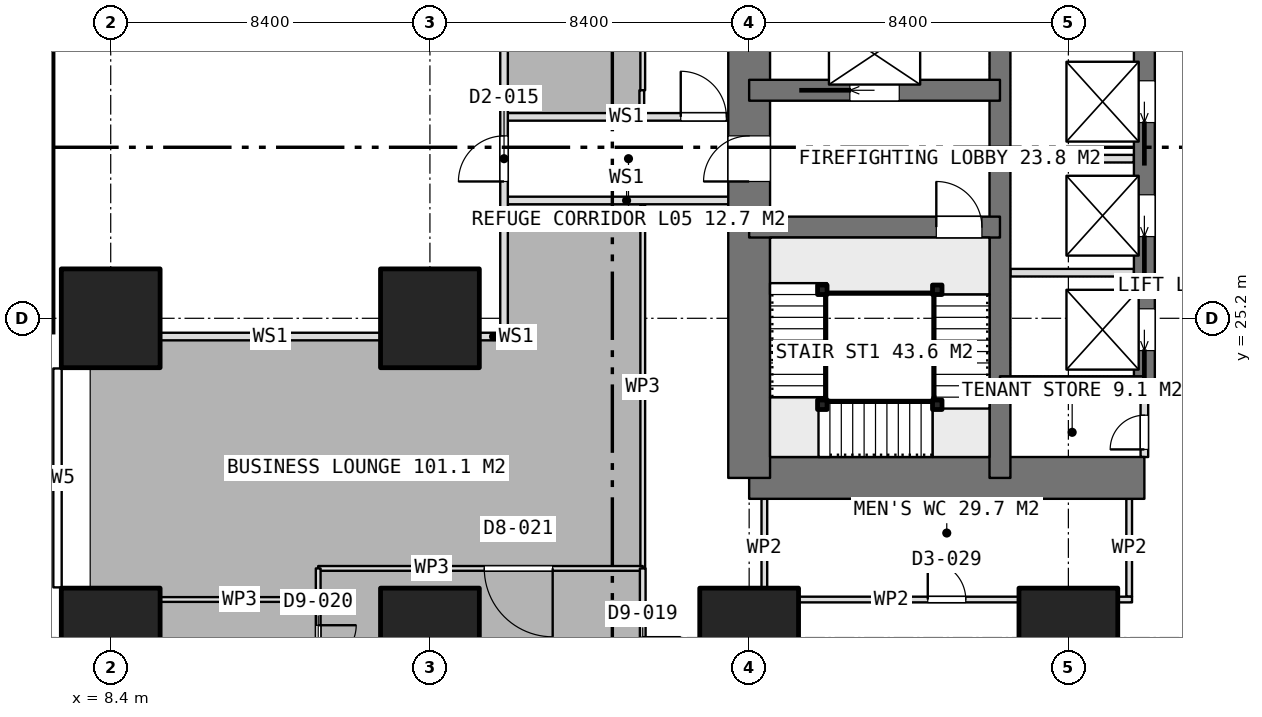
"""IFC4 building model, lengths in metres.
Left out: names, types, materials, properties, quantities, classifications, styles, units other than length and angle.
Written with IfcOpenShell. Run it as: python <this file> out.ifc"""

import sys

from ifc_helpers import new_model, si_unit, direction, frame, frame_2d, origin, origin_2d, place, context, subcontext, project, spatial, rectangle, extrude, element, fill, save


model = new_model("IFC4")
c1 = context("Model", 3, precision=1e-05, world=origin(), true_north=direction((0.0, 1.0)))
c2 = subcontext(c1, "Body", "Model", "MODEL_VIEW")
j1 = project(units=[si_unit("LENGTHUNIT", "METRE"), si_unit("PLANEANGLEUNIT", "RADIAN")], contexts=[c1])
p1 = place(None, origin())
s1 = spatial("IfcSite", under=j1, at=p1, CompositionType="ELEMENT")
p2 = place(p1, origin())
s2 = spatial("IfcBuilding", under=s1, at=p2, CompositionType="ELEMENT")
p3 = place(p2, frame((0.0, 0.0, 25.4)))
s3 = spatial("IfcBuildingStorey", under=s2, at=p3, CompositionType="ELEMENT", Elevation=25.4)
p4 = place(p3, frame((25.2, 21.0, 0.0), z_axis=(0.0, 0.0, 1.0), x_axis=(1.0, 0.0, 0.0)))
e1 = element("IfcWall", 1, at=p4, inside=s3, PredefinedType="SHEAR", context=c2, shape_type="SweptSolid", body=[
    extrude(rectangle(XDim=10.4, YDim=1.1, at=frame_2d((5.2, 0.0))), origin(), (0.0, 0.0, 1.0), 3.75),
])
p5 = place(p3, frame((25.2, 21.0, 0.0), z_axis=(0.0, 0.0, 1.0), x_axis=(0.0, 1.0, 0.0)))
e2 = element("IfcWall", 2, at=p5, inside=s3, PredefinedType="SHEAR", context=c2, shape_type="SweptSolid", body=[
    extrude(rectangle(XDim=25.2, YDim=1.1, at=frame_2d((12.6, 0.0))), origin(), (0.0, 0.0, 1.0), 3.75),
])
p6 = place(p5, frame((7.8, 0.0, 0.0)))
e3 = element("IfcOpeningElement", 3, at=p6, cuts=e2, PredefinedType="OPENING", context=c2, shape_type="SweptSolid", body=[
    extrude(rectangle(XDim=1.2, YDim=2.1, at=frame_2d((0.6, 1.05))), frame((0.0, 0.56, 0.0), z_axis=(0.0, -1.0, 0.0), x_axis=(1.0, 0.0, 0.0)), (0.0, 0.0, 1.0), 1.12),
])
p7 = place(p5, frame((14.25, 0.0, 0.0)))
e4 = element("IfcOpeningElement", 4, at=p7, cuts=e2, PredefinedType="OPENING", context=c2, shape_type="SweptSolid", body=[
    extrude(rectangle(XDim=0.9, YDim=2.1, at=frame_2d((0.45, 1.05))), frame((0.0, 0.56, 0.0), z_axis=(0.0, -1.0, 0.0), x_axis=(1.0, 0.0, 0.0)), (0.0, 0.0, 1.0), 1.12),
])
p8 = place(p5, frame((16.85, 0.0, 0.0)))
e5 = element("IfcOpeningElement", 5, at=p8, cuts=e2, PredefinedType="OPENING", context=c2, shape_type="SweptSolid", body=[
    extrude(rectangle(XDim=0.9, YDim=2.1, at=frame_2d((0.45, 1.05))), frame((0.0, 0.56, 0.0), z_axis=(0.0, -1.0, 0.0), x_axis=(1.0, 0.0, 0.0)), (0.0, 0.0, 1.0), 1.12),
])
p9 = place(p5, frame((19.075, 0.0, 0.0)))
e6 = element("IfcOpeningElement", 6, at=p9, cuts=e2, PredefinedType="OPENING", context=c2, shape_type="SweptSolid", body=[
    extrude(rectangle(XDim=1.2, YDim=2.1, at=frame_2d((0.6, 1.05))), frame((0.0, 0.56, 0.0), z_axis=(0.0, -1.0, 0.0), x_axis=(1.0, 0.0, 0.0)), (0.0, 0.0, 1.0), 1.12),
])
p10 = place(p3, frame((31.8, 21.0, 0.0), z_axis=(0.0, 0.0, 1.0), x_axis=(0.0, 1.0, 0.0)))
e7 = element("IfcWall", 7, at=p10, inside=s3, PredefinedType="SHEAR", context=c2, shape_type="SweptSolid", body=[
    extrude(rectangle(XDim=25.2, YDim=0.55, at=frame_2d((12.6, 0.0))), origin(), (0.0, 0.0, 1.0), 3.75),
])
p11 = place(p3, frame((35.6, 23.4, 0.0), z_axis=(0.0, 0.0, 1.0), x_axis=(0.0, 1.0, 0.0)))
e8 = element("IfcWall", 8, at=p11, inside=s3, PredefinedType="SHEAR", context=c2, shape_type="SweptSolid", body=[
    extrude(rectangle(XDim=18.0, YDim=0.55, at=frame_2d((9.0, 0.0))), origin(), (0.0, 0.0, 1.0), 3.75),
])
p12 = place(p11, frame((0.95, 0.0, 0.0)))
e9 = element("IfcOpeningElement", 9, at=p12, cuts=e8, PredefinedType="OPENING", context=c2, shape_type="SweptSolid", body=[
    extrude(rectangle(XDim=1.1, YDim=2.1, at=frame_2d((0.55, 1.05))), frame((0.0, 0.285, 0.0), z_axis=(0.0, -1.0, 0.0), x_axis=(1.0, 0.0, 0.0)), (0.0, 0.0, 1.0), 0.57),
])
p13 = place(p11, frame((3.95, 0.0, 0.0)))
e10 = element("IfcOpeningElement", 10, at=p13, cuts=e8, PredefinedType="OPENING", context=c2, shape_type="SweptSolid", body=[
    extrude(rectangle(XDim=1.1, YDim=2.1, at=frame_2d((0.55, 1.05))), frame((0.0, 0.285, 0.0), z_axis=(0.0, -1.0, 0.0), x_axis=(1.0, 0.0, 0.0)), (0.0, 0.0, 1.0), 0.57),
])
p14 = place(p11, frame((6.95, 0.0, 0.0)))
e11 = element("IfcOpeningElement", 11, at=p14, cuts=e8, PredefinedType="OPENING", context=c2, shape_type="SweptSolid", body=[
    extrude(rectangle(XDim=1.1, YDim=2.1, at=frame_2d((0.55, 1.05))), frame((0.0, 0.285, 0.0), z_axis=(0.0, -1.0, 0.0), x_axis=(1.0, 0.0, 0.0)), (0.0, 0.0, 1.0), 0.57),
])
p15 = place(p11, frame((9.95, 0.0, 0.0)))
e12 = element("IfcOpeningElement", 12, at=p15, cuts=e8, PredefinedType="OPENING", context=c2, shape_type="SweptSolid", body=[
    extrude(rectangle(XDim=1.1, YDim=2.1, at=frame_2d((0.55, 1.05))), frame((0.0, 0.285, 0.0), z_axis=(0.0, -1.0, 0.0), x_axis=(1.0, 0.0, 0.0)), (0.0, 0.0, 1.0), 0.57),
])
p16 = place(p11, frame((12.95, 0.0, 0.0)))
e13 = element("IfcOpeningElement", 13, at=p16, cuts=e8, PredefinedType="OPENING", context=c2, shape_type="SweptSolid", body=[
    extrude(rectangle(XDim=1.1, YDim=2.1, at=frame_2d((0.55, 1.05))), frame((0.0, 0.285, 0.0), z_axis=(0.0, -1.0, 0.0), x_axis=(1.0, 0.0, 0.0)), (0.0, 0.0, 1.0), 0.57),
])
p17 = place(p11, frame((15.95, 0.0, 0.0)))
e14 = element("IfcOpeningElement", 14, at=p17, cuts=e8, PredefinedType="OPENING", context=c2, shape_type="SweptSolid", body=[
    extrude(rectangle(XDim=1.1, YDim=2.1, at=frame_2d((0.55, 1.05))), frame((0.0, 0.285, 0.0), z_axis=(0.0, -1.0, 0.0), x_axis=(1.0, 0.0, 0.0)), (0.0, 0.0, 1.0), 0.57),
])
p18 = place(p3, frame((31.8, 23.4, 0.0), z_axis=(0.0, 0.0, 1.0), x_axis=(1.0, 0.0, 0.0)))
e15 = element("IfcWall", 15, at=p18, inside=s3, PredefinedType="SHEAR", context=c2, shape_type="SweptSolid", body=[
    extrude(rectangle(XDim=3.8, YDim=0.55, at=frame_2d((1.9, 0.0))), origin(), (0.0, 0.0, 1.0), 3.75),
])
p19 = place(p3, frame((25.2, 27.6, 0.0), z_axis=(0.0, 0.0, 1.0), x_axis=(1.0, 0.0, 0.0)))
e16 = element("IfcWall", 16, at=p19, inside=s3, PredefinedType="SHEAR", context=c2, shape_type="SweptSolid", body=[
    extrude(rectangle(XDim=6.6, YDim=0.55, at=frame_2d((3.3, 0.0))), origin(), (0.0, 0.0, 1.0), 3.75),
])
p20 = place(p19, frame((4.925, 0.0, 0.0)))
e17 = element("IfcOpeningElement", 17, at=p20, cuts=e16, PredefinedType="OPENING", context=c2, shape_type="SweptSolid", body=[
    extrude(rectangle(XDim=1.2, YDim=2.1, at=frame_2d((0.6, 1.05))), frame((0.0, 0.285, 0.0), z_axis=(0.0, -1.0, 0.0), x_axis=(1.0, 0.0, 0.0)), (0.0, 0.0, 1.0), 0.57),
])
p21 = place(p3, frame((25.2, 31.2, 0.0), z_axis=(0.0, 0.0, 1.0), x_axis=(1.0, 0.0, 0.0)))
e18 = element("IfcWall", 18, at=p21, inside=s3, PredefinedType="SHEAR", context=c2, shape_type="SweptSolid", body=[
    extrude(rectangle(XDim=6.6, YDim=0.55, at=frame_2d((3.3, 0.0))), origin(), (0.0, 0.0, 1.0), 3.75),
])
p22 = place(p21, frame((2.65, 0.0, 0.0)))
e19 = element("IfcOpeningElement", 19, at=p22, cuts=e18, PredefinedType="OPENING", context=c2, shape_type="SweptSolid", body=[
    extrude(rectangle(XDim=1.3, YDim=2.1, at=frame_2d((0.65, 1.05))), frame((0.0, 0.285, 0.0), z_axis=(0.0, -1.0, 0.0), x_axis=(1.0, 0.0, 0.0)), (0.0, 0.0, 1.0), 0.57),
])
for number, where, z_axis, x_axis in (
    (20, (8.4, 16.8, 0.0), (0.0, 0.0, 1.0), (1.0, 0.0, 0.0)),
    (21, (8.4, 25.2, 0.0), (0.0, 0.0, 1.0), (1.0, 0.0, 0.0)),
    (22, (16.8, 16.8, 0.0), (0.0, 0.0, 1.0), (1.0, 0.0, 0.0)),
    (23, (16.8, 25.2, 0.0), (0.0, 0.0, 1.0), (1.0, 0.0, 0.0)),
    (24, (25.2, 16.8, 0.0), (0.0, 0.0, 1.0), (1.0, 0.0, 0.0)),
    (25, (33.6, 16.8, 0.0), (0.0, 0.0, 1.0), (1.0, 0.0, 0.0)),
):
    element("IfcColumn", number, at=place(p3, frame(where, z_axis=z_axis, x_axis=x_axis)), inside=s3, PredefinedType="COLUMN", context=c2, shape_type="SweptSolid", body=[
        extrude(rectangle(XDim=2.6, YDim=2.6, at=origin_2d()), origin(), (0.0, 0.0, 1.0), 3.75),
    ])
for number, where, z_axis, x_axis in (
    (26, (32.075, 26.4, 0.0), (0.0, 0.0, 1.0), (1.0, 0.0, 0.0)),
    (27, (32.075, 29.4, 0.0), (0.0, 0.0, 1.0), (1.0, 0.0, 0.0)),
):
    element("IfcWall", number, at=place(p3, frame(where, z_axis=z_axis, x_axis=x_axis)), inside=s3, PredefinedType="PARTITIONING", context=c2, shape_type="SweptSolid", body=[
        extrude(rectangle(XDim=3.25, YDim=0.2, at=frame_2d((1.625, 0.0))), origin(), (0.0, 0.0, 1.0), 3.5),
    ])
p23 = place(p3, frame((35.6, 21.55, 0.0), z_axis=(0.0, 0.0, 1.0), x_axis=(0.0, 1.0, 0.0)))
e28 = element("IfcWall", 28, at=p23, inside=s3, PredefinedType="PARTITIONING", context=c2, shape_type="SweptSolid", body=[
    extrude(rectangle(XDim=1.575, YDim=0.2, at=frame_2d((0.788, 0.0))), origin(), (0.0, 0.0, 1.0), 3.5),
])
p24 = place(p23, frame((0.2, 0.0, 0.0)))
e29 = element("IfcOpeningElement", 29, at=p24, cuts=e28, PredefinedType="OPENING", context=c2, shape_type="SweptSolid", body=[
    extrude(rectangle(XDim=0.9, YDim=2.1, at=frame_2d((0.45, 1.05))), frame((0.0, 0.11, 0.0), z_axis=(0.0, -1.0, 0.0), x_axis=(1.0, 0.0, 0.0)), (0.0, 0.0, 1.0), 0.22),
])
p25 = place(p3, frame((25.525, 17.8, 0.0), z_axis=(0.0, 0.0, 1.0), x_axis=(1.0, 0.0, 0.0)))
e30 = element("IfcWall", 30, at=p25, inside=s3, PredefinedType="PARTITIONING", context=c2, shape_type="SweptSolid", body=[
    extrude(rectangle(XDim=9.75, YDim=0.15, at=frame_2d((4.875, 0.0))), origin(), (0.0, 0.0, 1.0), 3.5),
])
p26 = place(p25, frame((4.375, 0.0, 0.0)))
e31 = element("IfcOpeningElement", 31, at=p26, cuts=e30, PredefinedType="OPENING", context=c2, shape_type="SweptSolid", body=[
    extrude(rectangle(XDim=1.0, YDim=2.1, at=frame_2d((0.5, 1.05))), frame((0.0, 0.085, 0.0), z_axis=(0.0, -1.0, 0.0), x_axis=(1.0, 0.0, 0.0)), (0.0, 0.0, 1.0), 0.17),
])
for number, where, z_axis, x_axis in (
    (32, (25.6, 17.875, 0.0), (0.0, 0.0, 1.0), (0.0, 1.0, 0.0)),
    (33, (35.2, 17.875, 0.0), (0.0, 0.0, 1.0), (0.0, 1.0, 0.0)),
):
    element("IfcWall", number, at=place(p3, frame(where, z_axis=z_axis, x_axis=x_axis)), inside=s3, PredefinedType="PARTITIONING", context=c2, shape_type="SweptSolid", body=[
        extrude(rectangle(XDim=2.575, YDim=0.15, at=frame_2d((1.288, 0.0))), origin(), (0.0, 0.0, 1.0), 3.5),
    ])
p27 = place(p3, frame((22.4, 53.2, 0.0), z_axis=(0.0, 0.0, 1.0), x_axis=(0.0, -1.0, 0.0)))
e34 = element("IfcWall", 34, at=p27, inside=s3, PredefinedType="PARTITIONING", context=c2, shape_type="SweptSolid", body=[
    extrude(rectangle(XDim=22.0, YDim=0.125, at=frame_2d((11.0, 0.0))), origin(), (0.0, 0.0, 1.0), 3.5),
])
p28 = place(p3, frame((22.375, 31.2, 0.0), z_axis=(0.0, 0.0, 1.0), x_axis=(0.0, -1.0, 0.0)))
e35 = element("IfcWall", 35, at=p28, inside=s3, PredefinedType="PARTITIONING", context=c2, shape_type="SweptSolid", body=[
    extrude(rectangle(XDim=0.589, YDim=0.125, at=frame_2d((0.294, 0.0))), origin(), (0.0, 0.0, 1.0), 3.5),
])
p29 = place(p3, frame((13.86, 17.801, 0.0), z_axis=(0.0, 0.0, 1.0), x_axis=(-1.0, 0.0, 0.0)))
e36 = element("IfcWall", 36, at=p29, inside=s3, PredefinedType="PARTITIONING", context=c2, shape_type="SweptSolid", body=[
    extrude(rectangle(XDim=4.14, YDim=0.125, at=frame_2d((2.07, 0.0))), origin(), (0.0, 0.0, 1.0), 3.5),
])
p30 = place(p3, frame((22.4, 28.189, 0.0), z_axis=(0.0, 0.0, 1.0), x_axis=(0.0, -1.0, 0.0)))
e37 = element("IfcWall", 37, at=p30, inside=s3, PredefinedType="PARTITIONING", context=c2, shape_type="SweptSolid", body=[
    extrude(rectangle(XDim=9.57, YDim=0.125, at=frame_2d((4.785, 0.0))), origin(), (0.0, 0.0, 1.0), 3.5),
])
p31 = place(p3, frame((22.4, 18.619, 0.0), z_axis=(0.0, 0.0, 1.0), x_axis=(-1.0, 0.0, 0.0)))
e38 = element("IfcWall", 38, at=p31, inside=s3, PredefinedType="PARTITIONING", context=c2, shape_type="SweptSolid", body=[
    extrude(rectangle(XDim=8.54, YDim=0.125, at=frame_2d((4.27, 0.0))), origin(), (0.0, 0.0, 1.0), 3.5),
])
p32 = place(p31, frame((2.37, 0.0, 0.0)))
e39 = element("IfcOpeningElement", 39, at=p32, cuts=e38, PredefinedType="OPENING", context=c2, shape_type="SweptSolid", body=[
    extrude(rectangle(XDim=1.8, YDim=2.1, at=frame_2d((0.9, 1.05))), frame((0.0, 0.073, 0.0), z_axis=(0.0, -1.0, 0.0), x_axis=(1.0, 0.0, 0.0)), (0.0, 0.0, 1.0), 0.145),
])
p33 = place(p3, frame((13.86, 18.619, 0.0), z_axis=(0.0, 0.0, 1.0), x_axis=(0.0, -1.0, 0.0)))
e40 = element("IfcWall", 40, at=p33, inside=s3, PredefinedType="PARTITIONING", context=c2, shape_type="SweptSolid", body=[
    extrude(rectangle(XDim=0.818, YDim=0.125, at=frame_2d((0.409, 0.0))), origin(), (0.0, 0.0, 1.0), 3.5),
])
p34 = place(p3, frame((13.86, 17.8, 0.0), z_axis=(0.0, 0.0, 1.0), x_axis=(0.0, -1.0, 0.0)))
e41 = element("IfcWall", 41, at=p34, inside=s3, PredefinedType="PARTITIONING", context=c2, shape_type="SweptSolid", body=[
    extrude(rectangle(XDim=2.352, YDim=0.125, at=frame_2d((1.176, 0.0))), origin(), (0.0, 0.0, 1.0), 3.5),
])
p35 = place(p34, frame((0.676, 0.0, 0.0)))
e42 = element("IfcOpeningElement", 42, at=p35, cuts=e41, PredefinedType="OPENING", context=c2, shape_type="SweptSolid", body=[
    extrude(rectangle(XDim=1.0, YDim=2.1, at=frame_2d((0.5, 1.05))), frame((0.0, 0.073, 0.0), z_axis=(0.0, -1.0, 0.0), x_axis=(1.0, 0.0, 0.0)), (0.0, 0.0, 1.0), 0.145),
])
p36 = place(p3, frame((22.4, 18.619, 0.0), z_axis=(0.0, 0.0, 1.0), x_axis=(0.0, -1.0, 0.0)))
e43 = element("IfcWall", 43, at=p36, inside=s3, PredefinedType="PARTITIONING", context=c2, shape_type="SweptSolid", body=[
    extrude(rectangle(XDim=4.619, YDim=0.15, at=frame_2d((2.31, 0.0))), origin(), (0.0, 0.0, 1.0), 3.5),
])
p37 = place(p36, frame((1.809, 0.0, 0.0)))
e44 = element("IfcOpeningElement", 44, at=p37, cuts=e43, PredefinedType="OPENING", context=c2, shape_type="SweptSolid", body=[
    extrude(rectangle(XDim=1.0, YDim=2.1, at=frame_2d((0.5, 1.05))), frame((0.0, 0.085, 0.0), z_axis=(0.0, -1.0, 0.0), x_axis=(1.0, 0.0, 0.0)), (0.0, 0.0, 1.0), 0.17),
])
for number, where, z_axis, x_axis in (
    (45, (30.15, 25.95, 0.0), (0.0, 0.0, 1.0), (1.0, 0.0, 0.0)),
    (46, (30.15, 22.925, 0.0), (0.0, 0.0, 1.0), (1.0, 0.0, 0.0)),
    (47, (27.125, 22.925, 0.0), (0.0, 0.0, 1.0), (1.0, 0.0, 0.0)),
    (48, (27.125, 25.95, 0.0), (0.0, 0.0, 1.0), (1.0, 0.0, 0.0)),
):
    element("IfcColumn", number, at=place(p3, frame(where, z_axis=z_axis, x_axis=x_axis)), inside=s3, PredefinedType="COLUMN", context=c2, shape_type="SweptSolid", body=[
        extrude(rectangle(XDim=0.25, YDim=0.25, at=origin_2d()), origin(), (0.0, 0.0, 1.0), 3.75),
    ])
p38 = place(p3, frame((18.75, 24.82, 0.0), z_axis=(0.0, 0.0, 1.0), x_axis=(0.0, 1.0, 0.0)))
e49 = element("IfcWall", 49, at=p38, inside=s3, PredefinedType="PARTITIONING", context=c2, shape_type="SweptSolid", body=[
    extrude(rectangle(XDim=26.44, YDim=0.2, at=frame_2d((13.22, 0.0))), origin(), (0.0, 0.0, 1.0), 3.5),
])
p39 = place(p38, frame((3.98, 0.0, 0.0)))
e50 = element("IfcOpeningElement", 50, at=p39, cuts=e49, PredefinedType="OPENING", context=c2, shape_type="SweptSolid", body=[
    extrude(rectangle(XDim=1.2, YDim=2.1, at=frame_2d((0.6, 1.05))), frame((0.0, 0.11, 0.0), z_axis=(0.0, -1.0, 0.0), x_axis=(1.0, 0.0, 0.0)), (0.0, 0.0, 1.0), 0.22),
])
p40 = place(p3, frame((9.7, 24.72, 0.0), z_axis=(0.0, 0.0, 1.0), x_axis=(1.0, 0.0, 0.0)))
e51 = element("IfcWall", 51, at=p40, inside=s3, PredefinedType="PARTITIONING", context=c2, shape_type="SweptSolid", body=[
    extrude(rectangle(XDim=5.8, YDim=0.2, at=frame_2d((2.9, 0.0))), origin(), (0.0, 0.0, 1.0), 3.5),
])
p41 = place(p3, frame((18.1, 24.72, 0.0), z_axis=(0.0, 0.0, 1.0), x_axis=(1.0, 0.0, 0.0)))
e52 = element("IfcWall", 52, at=p41, inside=s3, PredefinedType="PARTITIONING", context=c2, shape_type="SweptSolid", body=[
    extrude(rectangle(XDim=0.75, YDim=0.2, at=frame_2d((0.375, 0.0))), origin(), (0.0, 0.0, 1.0), 3.5),
])
p42 = place(p3, frame((18.75, 30.5, 0.0), z_axis=(0.0, 0.0, 1.0), x_axis=(1.0, 0.0, 0.0)))
e53 = element("IfcWall", 53, at=p42, inside=s3, PredefinedType="PARTITIONING", context=c2, shape_type="SweptSolid", body=[
    extrude(rectangle(XDim=6.45, YDim=0.2, at=frame_2d((3.225, 0.0))), origin(), (0.0, 0.0, 1.0), 3.5),
])
p43 = place(p42, frame((4.65, 0.0, 0.0)))
e54 = element("IfcOpeningElement", 54, at=p43, cuts=e53, PredefinedType="OPENING", context=c2, shape_type="SweptSolid", body=[
    extrude(rectangle(XDim=1.2, YDim=2.1, at=frame_2d((0.6, 1.05))), frame((0.0, 0.11, 0.0), z_axis=(0.0, -1.0, 0.0), x_axis=(1.0, 0.0, 0.0)), (0.0, 0.0, 1.0), 0.22),
])
p44 = place(p3, frame((18.75, 28.3, 0.0), z_axis=(0.0, 0.0, 1.0), x_axis=(1.0, 0.0, 0.0)))
e55 = element("IfcWall", 55, at=p44, inside=s3, PredefinedType="PARTITIONING", context=c2, shape_type="SweptSolid", body=[
    extrude(rectangle(XDim=6.45, YDim=0.2, at=frame_2d((3.225, 0.0))), origin(), (0.0, 0.0, 1.0), 3.5),
])
p45 = place(p6, origin())
e56 = element("IfcDoor", 56, at=p45, inside=s3, OperationType="SINGLE_SWING_LEFT", PredefinedType="DOOR", context=c2, shape_type="SweptSolid", body=[
    extrude(rectangle(XDim=1.2, YDim=2.1, at=frame_2d((0.6, 1.05))), frame((0.0, 0.025, 0.0), z_axis=(0.0, -1.0, 0.0), x_axis=(1.0, 0.0, 0.0)), (0.0, 0.0, 1.0), 0.05),
])
fill(e3, e56)
p46 = place(p24, origin())
e57 = element("IfcDoor", 57, at=p46, inside=s3, OperationType="SINGLE_SWING_LEFT", PredefinedType="DOOR", context=c2, shape_type="SweptSolid", body=[
    extrude(rectangle(XDim=0.9, YDim=2.1, at=frame_2d((0.45, 1.05))), frame((0.0, 0.025, 0.0), z_axis=(0.0, -1.0, 0.0), x_axis=(1.0, 0.0, 0.0)), (0.0, 0.0, 1.0), 0.05),
])
fill(e29, e57)
p47 = place(p12, origin())
e58 = element("IfcDoor", 58, at=p47, inside=s3, OperationType="SLIDING_TO_LEFT", PredefinedType="USERDEFINED", context=c2, shape_type="SweptSolid", body=[
    extrude(rectangle(XDim=1.1, YDim=2.1, at=frame_2d((0.55, 1.05))), frame((0.0, 0.025, 0.0), z_axis=(0.0, -1.0, 0.0), x_axis=(1.0, 0.0, 0.0)), (0.0, 0.0, 1.0), 0.05),
])
fill(e9, e58)
p48 = place(p13, origin())
e59 = element("IfcDoor", 59, at=p48, inside=s3, OperationType="SLIDING_TO_LEFT", PredefinedType="USERDEFINED", context=c2, shape_type="SweptSolid", body=[
    extrude(rectangle(XDim=1.1, YDim=2.1, at=frame_2d((0.55, 1.05))), frame((0.0, 0.025, 0.0), z_axis=(0.0, -1.0, 0.0), x_axis=(1.0, 0.0, 0.0)), (0.0, 0.0, 1.0), 0.05),
])
fill(e10, e59)
p49 = place(p14, origin())
e60 = element("IfcDoor", 60, at=p49, inside=s3, OperationType="SLIDING_TO_LEFT", PredefinedType="USERDEFINED", context=c2, shape_type="SweptSolid", body=[
    extrude(rectangle(XDim=1.1, YDim=2.1, at=frame_2d((0.55, 1.05))), frame((0.0, 0.025, 0.0), z_axis=(0.0, -1.0, 0.0), x_axis=(1.0, 0.0, 0.0)), (0.0, 0.0, 1.0), 0.05),
])
fill(e11, e60)
p50 = place(p22, origin())
e61 = element("IfcDoor", 61, at=p50, inside=s3, OperationType="SLIDING_TO_LEFT", PredefinedType="USERDEFINED", context=c2, shape_type="SweptSolid", body=[
    extrude(rectangle(XDim=1.3, YDim=2.1, at=frame_2d((0.65, 1.05))), frame((0.0, 0.025, 0.0), z_axis=(0.0, -1.0, 0.0), x_axis=(1.0, 0.0, 0.0)), (0.0, 0.0, 1.0), 0.05),
])
fill(e19, e61)
p51 = place(p26, origin())
e62 = element("IfcDoor", 62, at=p51, inside=s3, OperationType="SINGLE_SWING_LEFT", PredefinedType="DOOR", context=c2, shape_type="SweptSolid", body=[
    extrude(rectangle(XDim=1.0, YDim=2.1, at=frame_2d((0.5, 1.05))), frame((0.0, 0.025, 0.0), z_axis=(0.0, -1.0, 0.0), x_axis=(1.0, 0.0, 0.0)), (0.0, 0.0, 1.0), 0.05),
])
fill(e31, e62)
p52 = place(p32, origin())
e63 = element("IfcDoor", 63, at=p52, inside=s3, OperationType="DOUBLE_DOOR_SINGLE_SWING", PredefinedType="DOOR", context=c2, shape_type="SweptSolid", body=[
    extrude(rectangle(XDim=1.8, YDim=2.1, at=frame_2d((0.9, 1.05))), frame((0.0, 0.025, 0.0), z_axis=(0.0, -1.0, 0.0), x_axis=(1.0, 0.0, 0.0)), (0.0, 0.0, 1.0), 0.05),
])
fill(e39, e63)
p53 = place(p35, origin())
e64 = element("IfcDoor", 64, at=p53, inside=s3, OperationType="SINGLE_SWING_LEFT", PredefinedType="DOOR", context=c2, shape_type="SweptSolid", body=[
    extrude(rectangle(XDim=1.0, YDim=2.1, at=frame_2d((0.5, 1.05))), frame((0.0, 0.025, 0.0), z_axis=(0.0, -1.0, 0.0), x_axis=(1.0, 0.0, 0.0)), (0.0, 0.0, 1.0), 0.05),
])
fill(e42, e64)
p54 = place(p37, origin())
e65 = element("IfcDoor", 65, at=p54, inside=s3, OperationType="SINGLE_SWING_LEFT", PredefinedType="DOOR", context=c2, shape_type="SweptSolid", body=[
    extrude(rectangle(XDim=1.0, YDim=2.1, at=frame_2d((0.5, 1.05))), frame((0.0, 0.025, 0.0), z_axis=(0.0, -1.0, 0.0), x_axis=(1.0, 0.0, 0.0)), (0.0, 0.0, 1.0), 0.05),
])
fill(e44, e65)
p55 = place(p20, origin())
e66 = element("IfcDoor", 66, at=p55, inside=s3, OperationType="SINGLE_SWING_RIGHT", PredefinedType="DOOR", context=c2, shape_type="SweptSolid", body=[
    extrude(rectangle(XDim=1.2, YDim=2.1, at=frame_2d((0.6, 1.05))), frame((0.0, 0.025, 0.0), z_axis=(0.0, -1.0, 0.0), x_axis=(1.0, 0.0, 0.0)), (0.0, 0.0, 1.0), 0.05),
])
fill(e17, e66)
p56 = place(p39, origin())
e67 = element("IfcDoor", 67, at=p56, inside=s3, OperationType="SINGLE_SWING_LEFT", PredefinedType="DOOR", context=c2, shape_type="SweptSolid", body=[
    extrude(rectangle(XDim=1.2, YDim=2.1, at=frame_2d((0.6, 1.05))), frame((0.0, 0.025, 0.0), z_axis=(0.0, -1.0, 0.0), x_axis=(1.0, 0.0, 0.0)), (0.0, 0.0, 1.0), 0.05),
])
fill(e50, e67)
p57 = place(p43, origin())
e68 = element("IfcDoor", 68, at=p57, inside=s3, OperationType="SINGLE_SWING_LEFT", PredefinedType="DOOR", context=c2, shape_type="SweptSolid", body=[
    extrude(rectangle(XDim=1.2, YDim=2.1, at=frame_2d((0.6, 1.05))), frame((0.0, 0.025, 0.0), z_axis=(0.0, -1.0, 0.0), x_axis=(1.0, 0.0, 0.0)), (0.0, 0.0, 1.0), 0.05),
])
fill(e54, e68)
save(model, sys.argv[1])
